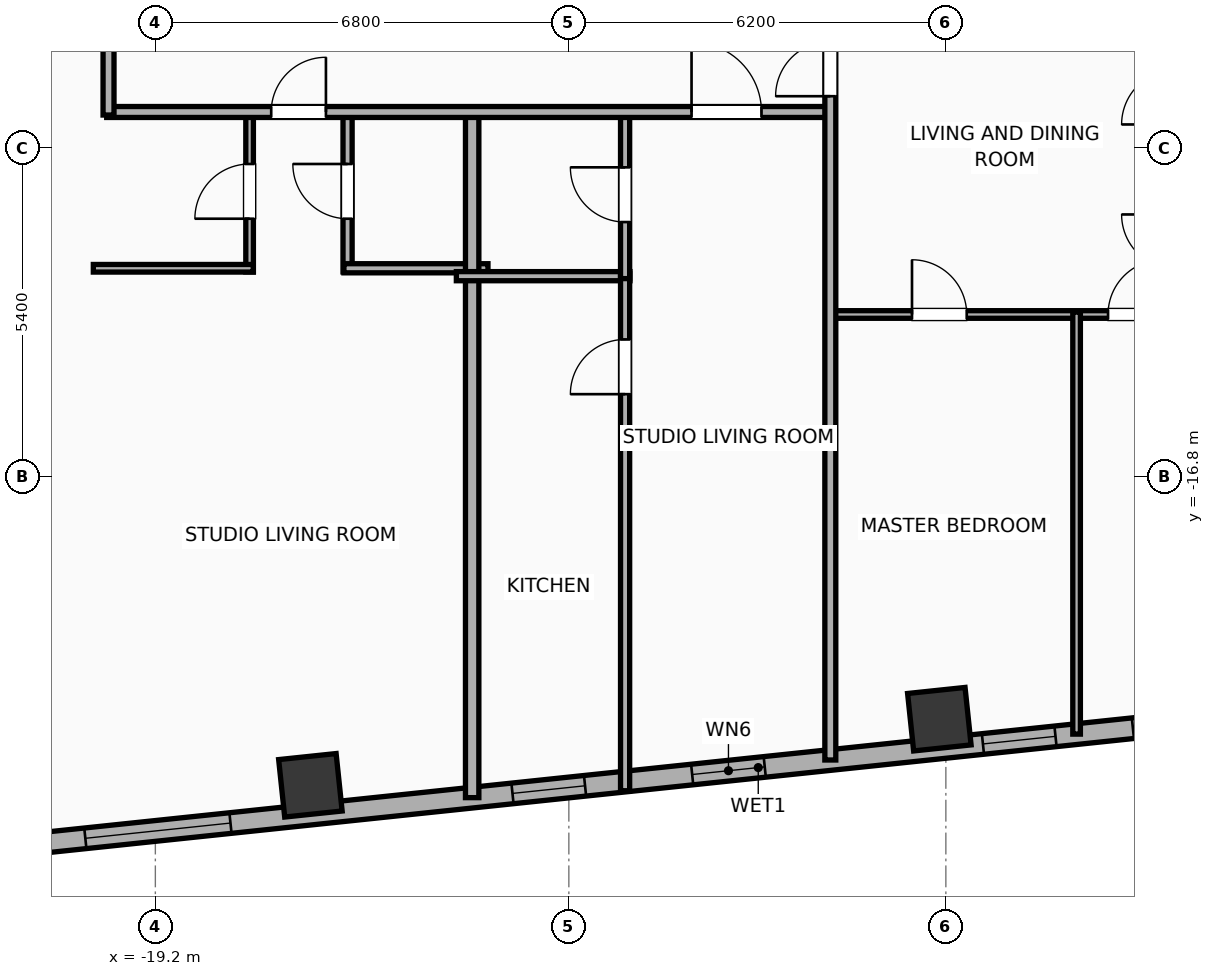
"""IFC4 building model, lengths in metres.
Left out: names, types, materials, properties, quantities, classifications, styles, units other than length and angle.
Written with IfcOpenShell. Run it as: python <this file> out.ifc"""

import sys

from ifc_helpers import new_model, si_unit, direction, frame, frame_2d, origin, origin_2d, place, context, subcontext, project, spatial, rectangle, hollow_rectangle, extrude, element, fill, save


model = new_model("IFC4")
c1 = context("Model", 3, precision=1e-05, world=origin(), true_north=direction((0.0, 1.0)))
c2 = subcontext(c1, "Body", "Model", "MODEL_VIEW")
j1 = project(units=[si_unit("LENGTHUNIT", "METRE"), si_unit("PLANEANGLEUNIT", "RADIAN")], contexts=[c1])
p1 = place(None, origin())
s1 = spatial("IfcSite", under=j1, at=p1, CompositionType="ELEMENT")
p2 = place(p1, origin())
s2 = spatial("IfcBuilding", under=s1, at=p2, CompositionType="ELEMENT")
p3 = place(p2, frame((0.0, 0.0, 140.4)))
s3 = spatial("IfcBuildingStorey", under=s2, at=p3, CompositionType="ELEMENT", Elevation=140.4)
for number, where, z_axis, x_axis in (
    (1, (-16.65, -21.873, -0.4), (0.0, 0.0, 1.0), (0.995, 0.105, 0.0)),
    (2, (-6.307, -20.785, -0.4), (0.0, 0.0, 1.0), (0.995, 0.105, 0.0)),
):
    element("IfcColumn", number, at=place(p3, frame(where, z_axis=z_axis, x_axis=x_axis)), inside=s3, PredefinedType="COLUMN", context=c2, shape_type="SweptSolid", body=[
        extrude(hollow_rectangle(XDim=0.95, YDim=0.95, WallThickness=0.032, at=origin_2d()), origin(), (0.0, 0.0, 1.0), 4.3),
    ])
p4 = place(p3, frame((24.756, -18.003, 0.0), z_axis=(0.0, 0.0, 1.0), x_axis=(-0.99452160744, -0.104531202687, 0.0)))
e3 = element("IfcWall", 3, at=p4, inside=s3, PredefinedType="ELEMENTEDWALL", context=c2, shape_type="SweptSolid", body=[
    extrude(rectangle(XDim=51.967, YDim=0.34, at=frame_2d((25.983, 0.0))), origin(), (0.0, 0.0, 1.0), 2.54),
])
p5 = place(p4, frame((14.84, 0.0, 0.0)))
e4 = element("IfcOpeningElement", 4, at=p5, cuts=e3, PredefinedType="OPENING", context=c2, shape_type="SweptSolid", body=[
    extrude(rectangle(XDim=1.5, YDim=2.05, at=frame_2d((0.75, 1.025))), frame((0.0, 0.18, 0.0), z_axis=(0.0, -1.0, 0.0), x_axis=(1.0, 0.0, 0.0)), (0.0, 0.0, 1.0), 0.36),
])
p6 = place(p4, frame((25.633, 0.0, 0.75)))
e5 = element("IfcOpeningElement", 5, at=p6, cuts=e3, PredefinedType="OPENING", context=c2, shape_type="SweptSolid", body=[
    extrude(rectangle(XDim=2.4, YDim=1.63, at=frame_2d((1.2, 0.815))), frame((0.0, 0.18, 0.0), z_axis=(0.0, -1.0, 0.0), x_axis=(1.0, 0.0, 0.0)), (0.0, 0.0, 1.0), 0.36),
])
p7 = place(p4, frame((42.955, 0.0, 0.75)))
e6 = element("IfcOpeningElement", 6, at=p7, cuts=e3, PredefinedType="OPENING", context=c2, shape_type="SweptSolid", body=[
    extrude(rectangle(XDim=2.4, YDim=1.63, at=frame_2d((1.2, 0.815))), frame((0.0, 0.18, 0.0), z_axis=(0.0, -1.0, 0.0), x_axis=(1.0, 0.0, 0.0)), (0.0, 0.0, 1.0), 0.36),
])
p8 = place(p4, frame((34.121, 0.0, 0.75)))
e7 = element("IfcOpeningElement", 7, at=p8, cuts=e3, PredefinedType="OPENING", context=c2, shape_type="SweptSolid", body=[
    extrude(rectangle(XDim=1.2, YDim=1.63, at=frame_2d((0.6, 0.815))), frame((0.0, 0.18, 0.0), z_axis=(0.0, -1.0, 0.0), x_axis=(1.0, 0.0, 0.0)), (0.0, 0.0, 1.0), 0.36),
])
p9 = place(p4, frame((37.092, 0.0, 0.75)))
e8 = element("IfcOpeningElement", 8, at=p9, cuts=e3, PredefinedType="OPENING", context=c2, shape_type="SweptSolid", body=[
    extrude(rectangle(XDim=1.2, YDim=1.63, at=frame_2d((0.6, 0.815))), frame((0.0, 0.18, 0.0), z_axis=(0.0, -1.0, 0.0), x_axis=(1.0, 0.0, 0.0)), (0.0, 0.0, 1.0), 0.36),
])
p10 = place(p4, frame((11.388, 0.0, 0.75)))
e9 = element("IfcOpeningElement", 9, at=p10, cuts=e3, PredefinedType="OPENING", context=c2, shape_type="SweptSolid", body=[
    extrude(rectangle(XDim=1.2, YDim=1.63, at=frame_2d((0.6, 0.815))), frame((0.0, 0.18, 0.0), z_axis=(0.0, -1.0, 0.0), x_axis=(1.0, 0.0, 0.0)), (0.0, 0.0, 1.0), 0.36),
])
p11 = place(p4, frame((8.332, 0.0, 0.75)))
e10 = element("IfcOpeningElement", 10, at=p11, cuts=e3, PredefinedType="OPENING", context=c2, shape_type="SweptSolid", body=[
    extrude(rectangle(XDim=1.2, YDim=1.63, at=frame_2d((0.6, 0.815))), frame((0.0, 0.18, 0.0), z_axis=(0.0, -1.0, 0.0), x_axis=(1.0, 0.0, 0.0)), (0.0, 0.0, 1.0), 0.36),
])
p12 = place(p4, frame((5.331, 0.0, 0.75)))
e11 = element("IfcOpeningElement", 11, at=p12, cuts=e3, PredefinedType="OPENING", context=c2, shape_type="SweptSolid", body=[
    extrude(rectangle(XDim=1.2, YDim=1.63, at=frame_2d((0.6, 0.815))), frame((0.0, 0.18, 0.0), z_axis=(0.0, -1.0, 0.0), x_axis=(1.0, 0.0, 0.0)), (0.0, 0.0, 1.0), 0.36),
])
p13 = place(p4, frame((29.313, 0.0, 0.75)))
e12 = element("IfcOpeningElement", 12, at=p13, cuts=e3, PredefinedType="OPENING", context=c2, shape_type="SweptSolid", body=[
    extrude(rectangle(XDim=1.2, YDim=1.63, at=frame_2d((0.6, 0.815))), frame((0.0, 0.18, 0.0), z_axis=(0.0, -1.0, 0.0), x_axis=(1.0, 0.0, 0.0)), (0.0, 0.0, 1.0), 0.36),
])
p14 = place(p4, frame((22.248, 0.0, 0.75)))
e13 = element("IfcOpeningElement", 13, at=p14, cuts=e3, PredefinedType="OPENING", context=c2, shape_type="SweptSolid", body=[
    extrude(rectangle(XDim=1.2, YDim=1.63, at=frame_2d((0.6, 0.815))), frame((0.0, 0.18, 0.0), z_axis=(0.0, -1.0, 0.0), x_axis=(1.0, 0.0, 0.0)), (0.0, 0.0, 1.0), 0.36),
])
p15 = place(p4, frame((18.186, 0.0, 0.75)))
e14 = element("IfcOpeningElement", 14, at=p15, cuts=e3, PredefinedType="OPENING", context=c2, shape_type="SweptSolid", body=[
    extrude(rectangle(XDim=1.2, YDim=1.63, at=frame_2d((0.6, 0.815))), frame((0.0, 0.18, 0.0), z_axis=(0.0, -1.0, 0.0), x_axis=(1.0, 0.0, 0.0)), (0.0, 0.0, 1.0), 0.36),
])
p16 = place(p4, frame((0.718, 0.0, 0.75)))
e15 = element("IfcOpeningElement", 15, at=p16, cuts=e3, PredefinedType="OPENING", context=c2, shape_type="SweptSolid", body=[
    extrude(rectangle(XDim=1.2, YDim=1.63, at=frame_2d((0.6, 0.815))), frame((0.0, 0.18, 0.0), z_axis=(0.0, -1.0, 0.0), x_axis=(1.0, 0.0, 0.0)), (0.0, 0.0, 1.0), 0.36),
])
p17 = place(p3, frame((-17.65, -13.43, 0.0), z_axis=(0.0, 0.0, 1.0), x_axis=(0.0, 1.0, 0.0)))
e16 = element("IfcWall", 16, at=p17, inside=s3, PredefinedType="PARTITIONING", context=c2, shape_type="SweptSolid", body=[
    extrude(rectangle(XDim=2.65, YDim=0.125, at=frame_2d((1.325, 0.0))), origin(), (0.0, 0.0, 1.0), 3.65),
])
p18 = place(p17, frame((0.875, 0.0, 0.0)))
e17 = element("IfcOpeningElement", 17, at=p18, cuts=e16, PredefinedType="OPENING", context=c2, shape_type="SweptSolid", body=[
    extrude(rectangle(XDim=0.9, YDim=2.05, at=frame_2d((0.45, 1.025))), frame((0.0, 0.073, 0.0), z_axis=(0.0, -1.0, 0.0), x_axis=(1.0, 0.0, 0.0)), (0.0, 0.0, 1.0), 0.145),
])
p19 = place(p3, frame((-16.039, -13.43, 0.0), z_axis=(0.0, 0.0, 1.0), x_axis=(0.0, 1.0, 0.0)))
e18 = element("IfcWall", 18, at=p19, inside=s3, PredefinedType="PLUMBINGWALL", context=c2, shape_type="SweptSolid", body=[
    extrude(rectangle(XDim=2.65, YDim=0.15, at=frame_2d((1.325, 0.0))), origin(), (0.0, 0.0, 1.0), 2.54),
])
p20 = place(p19, frame((0.875, 0.0, 0.0)))
e19 = element("IfcOpeningElement", 19, at=p20, cuts=e18, PredefinedType="OPENING", context=c2, shape_type="SweptSolid", body=[
    extrude(rectangle(XDim=0.9, YDim=2.05, at=frame_2d((0.45, 1.025))), frame((0.0, 0.085, 0.0), z_axis=(0.0, -1.0, 0.0), x_axis=(1.0, 0.0, 0.0)), (0.0, 0.0, 1.0), 0.17),
])
p21 = place(p3, frame((-20.22, -13.37, 0.0), z_axis=(0.0, 0.0, 1.0), x_axis=(1.0, 0.0, 0.0)))
e20 = element("IfcWall", 20, at=p21, inside=s3, PredefinedType="PARTITIONING", context=c2, shape_type="SweptSolid", body=[
    extrude(rectangle(XDim=2.63, YDim=0.125, at=frame_2d((1.315, 0.0))), origin(), (0.0, 0.0, 1.0), 3.65),
])
p22 = place(p3, frame((-16.099, -13.37, 0.0), z_axis=(0.0, 0.0, 1.0), x_axis=(1.0, 0.0, 0.0)))
e21 = element("IfcWall", 21, at=p22, inside=s3, PredefinedType="PLUMBINGWALL", context=c2, shape_type="SweptSolid", body=[
    extrude(rectangle(XDim=2.369, YDim=0.15, at=frame_2d((1.185, 0.0))), origin(), (0.0, 0.0, 1.0), 3.65),
])
p23 = place(p3, frame((-13.99, -22.075, 0.0), z_axis=(0.0, 0.0, 1.0), x_axis=(0.0, 1.0, 0.0)))
e22 = element("IfcWall", 22, at=p23, inside=s3, PredefinedType="PARTITIONING", context=c2, shape_type="SweptSolid", body=[
    extrude(rectangle(XDim=11.355, YDim=0.22, at=frame_2d((5.678, 0.0))), origin(), (0.0, 0.0, 1.0), 3.65),
])
p24 = place(p3, frame((-14.25, -13.5, 0.0), z_axis=(0.0, 0.0, 1.0), x_axis=(1.0, 0.0, 0.0)))
e23 = element("IfcWall", 23, at=p24, inside=s3, PredefinedType="PLUMBINGWALL", context=c2, shape_type="SweptSolid", body=[
    extrude(rectangle(XDim=2.855, YDim=0.15, at=frame_2d((1.427, 0.0))), origin(), (0.0, 0.0, 1.0), 3.65),
])
p25 = place(p3, frame((-11.475, -21.962, 0.0), z_axis=(0.0, 0.0, 1.0), x_axis=(0.0, 1.0, 0.0)))
e24 = element("IfcWall", 24, at=p25, inside=s3, PredefinedType="PLUMBINGWALL", context=c2, shape_type="SweptSolid", body=[
    extrude(rectangle(XDim=8.502, YDim=0.15, at=frame_2d((4.251, 0.0))), origin(), (0.0, 0.0, 1.0), 3.65),
])
p26 = place(p25, frame((6.521, 0.0, 0.0)))
e25 = element("IfcOpeningElement", 25, at=p26, cuts=e24, PredefinedType="OPENING", context=c2, shape_type="SweptSolid", body=[
    extrude(rectangle(XDim=0.9, YDim=2.05, at=frame_2d((0.45, 1.025))), frame((0.0, 0.085, 0.0), z_axis=(0.0, -1.0, 0.0), x_axis=(1.0, 0.0, 0.0)), (0.0, 0.0, 1.0), 0.17),
])
p27 = place(p3, frame((-11.475, -13.54, 0.0), z_axis=(0.0, 0.0, 1.0), x_axis=(0.0, 1.0, 0.0)))
e26 = element("IfcWall", 26, at=p27, inside=s3, PredefinedType="PLUMBINGWALL", context=c2, shape_type="SweptSolid", body=[
    extrude(rectangle(XDim=2.76, YDim=0.15, at=frame_2d((1.38, 0.0))), origin(), (0.0, 0.0, 1.0), 3.65),
])
p28 = place(p27, frame((0.93, 0.0, 0.0)))
e27 = element("IfcOpeningElement", 27, at=p28, cuts=e26, PredefinedType="OPENING", context=c2, shape_type="SweptSolid", body=[
    extrude(rectangle(XDim=0.9, YDim=2.05, at=frame_2d((0.45, 1.025))), frame((0.0, 0.085, 0.0), z_axis=(0.0, -1.0, 0.0), x_axis=(1.0, 0.0, 0.0)), (0.0, 0.0, 1.0), 0.17),
])
p29 = place(p3, frame((-20.0, -10.8, 0.0), z_axis=(0.0, 0.0, 1.0), x_axis=(1.0, 0.0, 0.0)))
e28 = element("IfcWall", 28, at=p29, inside=s3, PredefinedType="PARTITIONING", context=c2, shape_type="SweptSolid", body=[
    extrude(rectangle(XDim=11.92, YDim=0.18, at=frame_2d((5.96, 0.0))), origin(), (0.0, 0.0, 1.0), 3.65),
])
p30 = place(p29, frame((2.705, 0.0, 0.0)))
e29 = element("IfcOpeningElement", 29, at=p30, cuts=e28, PredefinedType="OPENING", context=c2, shape_type="SweptSolid", body=[
    extrude(rectangle(XDim=0.9, YDim=2.05, at=frame_2d((0.45, 1.025))), frame((0.0, 0.1, 0.0), z_axis=(0.0, -1.0, 0.0), x_axis=(1.0, 0.0, 0.0)), (0.0, 0.0, 1.0), 0.2),
])
p31 = place(p29, frame((9.618, 0.0, 0.0)))
e30 = element("IfcOpeningElement", 30, at=p31, cuts=e28, PredefinedType="OPENING", context=c2, shape_type="SweptSolid", body=[
    extrude(rectangle(XDim=1.15, YDim=2.05, at=frame_2d((0.575, 1.025))), frame((0.0, 0.1, 0.0), z_axis=(0.0, -1.0, 0.0), x_axis=(1.0, 0.0, 0.0)), (0.0, 0.0, 1.0), 0.2),
])
p32 = place(p3, frame((-8.08, -14.13, 0.0), z_axis=(0.0, 0.0, 1.0), x_axis=(1.0, 0.0, 0.0)))
e31 = element("IfcWall", 31, at=p32, inside=s3, PredefinedType="PARTITIONING", context=c2, shape_type="SweptSolid", body=[
    extrude(rectangle(XDim=8.06, YDim=0.125, at=frame_2d((4.03, 0.0))), origin(), (0.0, 0.0, 1.0), 3.65),
])
p33 = place(p32, frame((1.323, 0.0, 0.0)))
e32 = element("IfcOpeningElement", 32, at=p33, cuts=e31, PredefinedType="OPENING", context=c2, shape_type="SweptSolid", body=[
    extrude(rectangle(XDim=0.9, YDim=2.05, at=frame_2d((0.45, 1.025))), frame((0.0, 0.073, 0.0), z_axis=(0.0, -1.0, 0.0), x_axis=(1.0, 0.0, 0.0)), (0.0, 0.0, 1.0), 0.145),
])
p34 = place(p32, frame((4.547, 0.0, 0.0)))
e33 = element("IfcOpeningElement", 33, at=p34, cuts=e31, PredefinedType="OPENING", context=c2, shape_type="SweptSolid", body=[
    extrude(rectangle(XDim=0.9, YDim=2.05, at=frame_2d((0.45, 1.025))), frame((0.0, 0.073, 0.0), z_axis=(0.0, -1.0, 0.0), x_axis=(1.0, 0.0, 0.0)), (0.0, 0.0, 1.0), 0.145),
])
p35 = place(p3, frame((-4.05, -21.031, 0.0), z_axis=(0.0, 0.0, 1.0), x_axis=(0.0, 1.0, 0.0)))
e34 = element("IfcWall", 34, at=p35, inside=s3, PredefinedType="PARTITIONING", context=c2, shape_type="SweptSolid", body=[
    extrude(rectangle(XDim=6.941, YDim=0.125, at=frame_2d((3.47, 0.0))), origin(), (0.0, 0.0, 1.0), 3.65),
])
p36 = place(p3, frame((-8.1, -21.456, 0.0), z_axis=(0.0, 0.0, 1.0), x_axis=(0.0, 1.0, 0.0)))
e35 = element("IfcWall", 35, at=p36, inside=s3, PredefinedType="PARTITIONING", context=c2, shape_type="SweptSolid", body=[
    extrude(rectangle(XDim=12.166, YDim=0.18, at=frame_2d((6.083, 0.0))), origin(), (0.0, 0.0, 1.0), 3.65),
])
p37 = place(p36, frame((10.916, 0.0, 0.0)))
e36 = element("IfcOpeningElement", 36, at=p37, cuts=e35, PredefinedType="OPENING", context=c2, shape_type="SweptSolid", body=[
    extrude(rectangle(XDim=0.9, YDim=2.05, at=frame_2d((0.45, 1.025))), frame((0.0, 0.1, 0.0), z_axis=(0.0, -1.0, 0.0), x_axis=(1.0, 0.0, 0.0)), (0.0, 0.0, 1.0), 0.2),
])
p38 = place(p3, frame((-19.97, -10.85, 0.0), z_axis=(0.0, 0.0, 1.0), x_axis=(0.0, 1.0, 0.0)))
e37 = element("IfcWall", 37, at=p38, inside=s3, PredefinedType="PARTITIONING", context=c2, shape_type="SweptSolid", body=[
    extrude(rectangle(XDim=21.7, YDim=0.18, at=frame_2d((10.85, 0.0))), origin(), (0.0, 0.0, 1.0), 2.54),
])
p39 = place(p38, frame((19.055, 0.0, 0.0)))
e38 = element("IfcOpeningElement", 38, at=p39, cuts=e37, PredefinedType="OPENING", context=c2, shape_type="SweptSolid", body=[
    extrude(rectangle(XDim=0.95, YDim=2.05, at=frame_2d((0.475, 1.025))), frame((0.0, 0.1, 0.0), z_axis=(0.0, -1.0, 0.0), x_axis=(1.0, 0.0, 0.0)), (0.0, 0.0, 1.0), 0.2),
])
p40 = place(p6, origin())
e39 = element("IfcWindow", 39, at=p40, inside=s3, PartitioningType="SINGLE_PANEL", PredefinedType="WINDOW", context=c2, shape_type="SweptSolid", body=[
    extrude(rectangle(XDim=2.4, YDim=1.63, at=frame_2d((1.2, 0.815))), frame((0.0, 0.03, 0.0), z_axis=(0.0, -1.0, 0.0), x_axis=(1.0, 0.0, 0.0)), (0.0, 0.0, 1.0), 0.06),
])
fill(e5, e39)
p41 = place(p7, origin())
e40 = element("IfcWindow", 40, at=p41, inside=s3, PartitioningType="SINGLE_PANEL", PredefinedType="WINDOW", context=c2, shape_type="SweptSolid", body=[
    extrude(rectangle(XDim=2.4, YDim=1.63, at=frame_2d((1.2, 0.815))), frame((0.0, 0.03, 0.0), z_axis=(0.0, -1.0, 0.0), x_axis=(1.0, 0.0, 0.0)), (0.0, 0.0, 1.0), 0.06),
])
fill(e6, e40)
p42 = place(p8, origin())
e41 = element("IfcWindow", 41, at=p42, inside=s3, PartitioningType="SINGLE_PANEL", PredefinedType="WINDOW", context=c2, shape_type="SweptSolid", body=[
    extrude(rectangle(XDim=1.2, YDim=1.63, at=frame_2d((0.6, 0.815))), frame((0.0, 0.03, 0.0), z_axis=(0.0, -1.0, 0.0), x_axis=(1.0, 0.0, 0.0)), (0.0, 0.0, 1.0), 0.06),
])
fill(e7, e41)
p43 = place(p9, origin())
e42 = element("IfcWindow", 42, at=p43, inside=s3, PartitioningType="SINGLE_PANEL", PredefinedType="WINDOW", context=c2, shape_type="SweptSolid", body=[
    extrude(rectangle(XDim=1.2, YDim=1.63, at=frame_2d((0.6, 0.815))), frame((0.0, 0.03, 0.0), z_axis=(0.0, -1.0, 0.0), x_axis=(1.0, 0.0, 0.0)), (0.0, 0.0, 1.0), 0.06),
])
fill(e8, e42)
p44 = place(p13, origin())
e43 = element("IfcWindow", 43, at=p44, inside=s3, PartitioningType="SINGLE_PANEL", PredefinedType="WINDOW", context=c2, shape_type="SweptSolid", body=[
    extrude(rectangle(XDim=1.2, YDim=1.63, at=frame_2d((0.6, 0.815))), frame((0.0, 0.03, 0.0), z_axis=(0.0, -1.0, 0.0), x_axis=(1.0, 0.0, 0.0)), (0.0, 0.0, 1.0), 0.06),
])
fill(e12, e43)
p45 = place(p18, origin())
e44 = element("IfcDoor", 44, at=p45, inside=s3, OperationType="SINGLE_SWING_LEFT", PredefinedType="DOOR", context=c2, shape_type="SweptSolid", body=[
    extrude(rectangle(XDim=0.9, YDim=2.05, at=frame_2d((0.45, 1.025))), frame((0.0, 0.025, 0.0), z_axis=(0.0, -1.0, 0.0), x_axis=(1.0, 0.0, 0.0)), (0.0, 0.0, 1.0), 0.05),
])
fill(e17, e44)
p46 = place(p20, origin())
e45 = element("IfcDoor", 45, at=p46, inside=s3, OperationType="SINGLE_SWING_RIGHT", PredefinedType="DOOR", context=c2, shape_type="SweptSolid", body=[
    extrude(rectangle(XDim=0.9, YDim=2.05, at=frame_2d((0.45, 1.025))), frame((0.0, 0.025, 0.0), z_axis=(0.0, -1.0, 0.0), x_axis=(1.0, 0.0, 0.0)), (0.0, 0.0, 1.0), 0.05),
])
fill(e19, e45)
p47 = place(p26, origin())
e46 = element("IfcDoor", 46, at=p47, inside=s3, OperationType="SINGLE_SWING_LEFT", PredefinedType="DOOR", context=c2, shape_type="SweptSolid", body=[
    extrude(rectangle(XDim=0.9, YDim=2.05, at=frame_2d((0.45, 1.025))), frame((0.0, 0.025, 0.0), z_axis=(0.0, -1.0, 0.0), x_axis=(1.0, 0.0, 0.0)), (0.0, 0.0, 1.0), 0.05),
])
fill(e25, e46)
p48 = place(p28, origin())
e47 = element("IfcDoor", 47, at=p48, inside=s3, OperationType="SINGLE_SWING_RIGHT", PredefinedType="DOOR", context=c2, shape_type="SweptSolid", body=[
    extrude(rectangle(XDim=0.9, YDim=2.05, at=frame_2d((0.45, 1.025))), frame((0.0, 0.025, 0.0), z_axis=(0.0, -1.0, 0.0), x_axis=(1.0, 0.0, 0.0)), (0.0, 0.0, 1.0), 0.05),
])
fill(e27, e47)
p49 = place(p30, origin())
e48 = element("IfcDoor", 48, at=p49, inside=s3, OperationType="SINGLE_SWING_RIGHT", PredefinedType="DOOR", context=c2, shape_type="SweptSolid", body=[
    extrude(rectangle(XDim=0.9, YDim=2.05, at=frame_2d((0.45, 1.025))), frame((0.0, 0.025, 0.0), z_axis=(0.0, -1.0, 0.0), x_axis=(1.0, 0.0, 0.0)), (0.0, 0.0, 1.0), 0.05),
])
fill(e29, e48)
p50 = place(p31, origin())
e49 = element("IfcDoor", 49, at=p50, inside=s3, OperationType="SINGLE_SWING_LEFT", PredefinedType="DOOR", context=c2, shape_type="SweptSolid", body=[
    extrude(rectangle(XDim=1.15, YDim=2.05, at=frame_2d((0.575, 1.025))), frame((0.0, 0.025, 0.0), z_axis=(0.0, -1.0, 0.0), x_axis=(1.0, 0.0, 0.0)), (0.0, 0.0, 1.0), 0.05),
])
fill(e30, e49)
p51 = place(p33, origin())
e50 = element("IfcDoor", 50, at=p51, inside=s3, OperationType="SINGLE_SWING_LEFT", PredefinedType="DOOR", context=c2, shape_type="SweptSolid", body=[
    extrude(rectangle(XDim=0.9, YDim=2.05, at=frame_2d((0.45, 1.025))), frame((0.0, 0.025, 0.0), z_axis=(0.0, -1.0, 0.0), x_axis=(1.0, 0.0, 0.0)), (0.0, 0.0, 1.0), 0.05),
])
fill(e32, e50)
p52 = place(p34, origin())
e51 = element("IfcDoor", 51, at=p52, inside=s3, OperationType="SINGLE_SWING_RIGHT", PredefinedType="DOOR", context=c2, shape_type="SweptSolid", body=[
    extrude(rectangle(XDim=0.9, YDim=2.05, at=frame_2d((0.45, 1.025))), frame((0.0, 0.025, 0.0), z_axis=(0.0, -1.0, 0.0), x_axis=(1.0, 0.0, 0.0)), (0.0, 0.0, 1.0), 0.05),
])
fill(e33, e51)
p53 = place(p37, origin())
e52 = element("IfcDoor", 52, at=p53, inside=s3, OperationType="SINGLE_SWING_LEFT", PredefinedType="DOOR", context=c2, shape_type="SweptSolid", body=[
    extrude(rectangle(XDim=0.9, YDim=2.05, at=frame_2d((0.45, 1.025))), frame((0.0, 0.025, 0.0), z_axis=(0.0, -1.0, 0.0), x_axis=(1.0, 0.0, 0.0)), (0.0, 0.0, 1.0), 0.05),
])
fill(e36, e52)
save(model, sys.argv[1])
